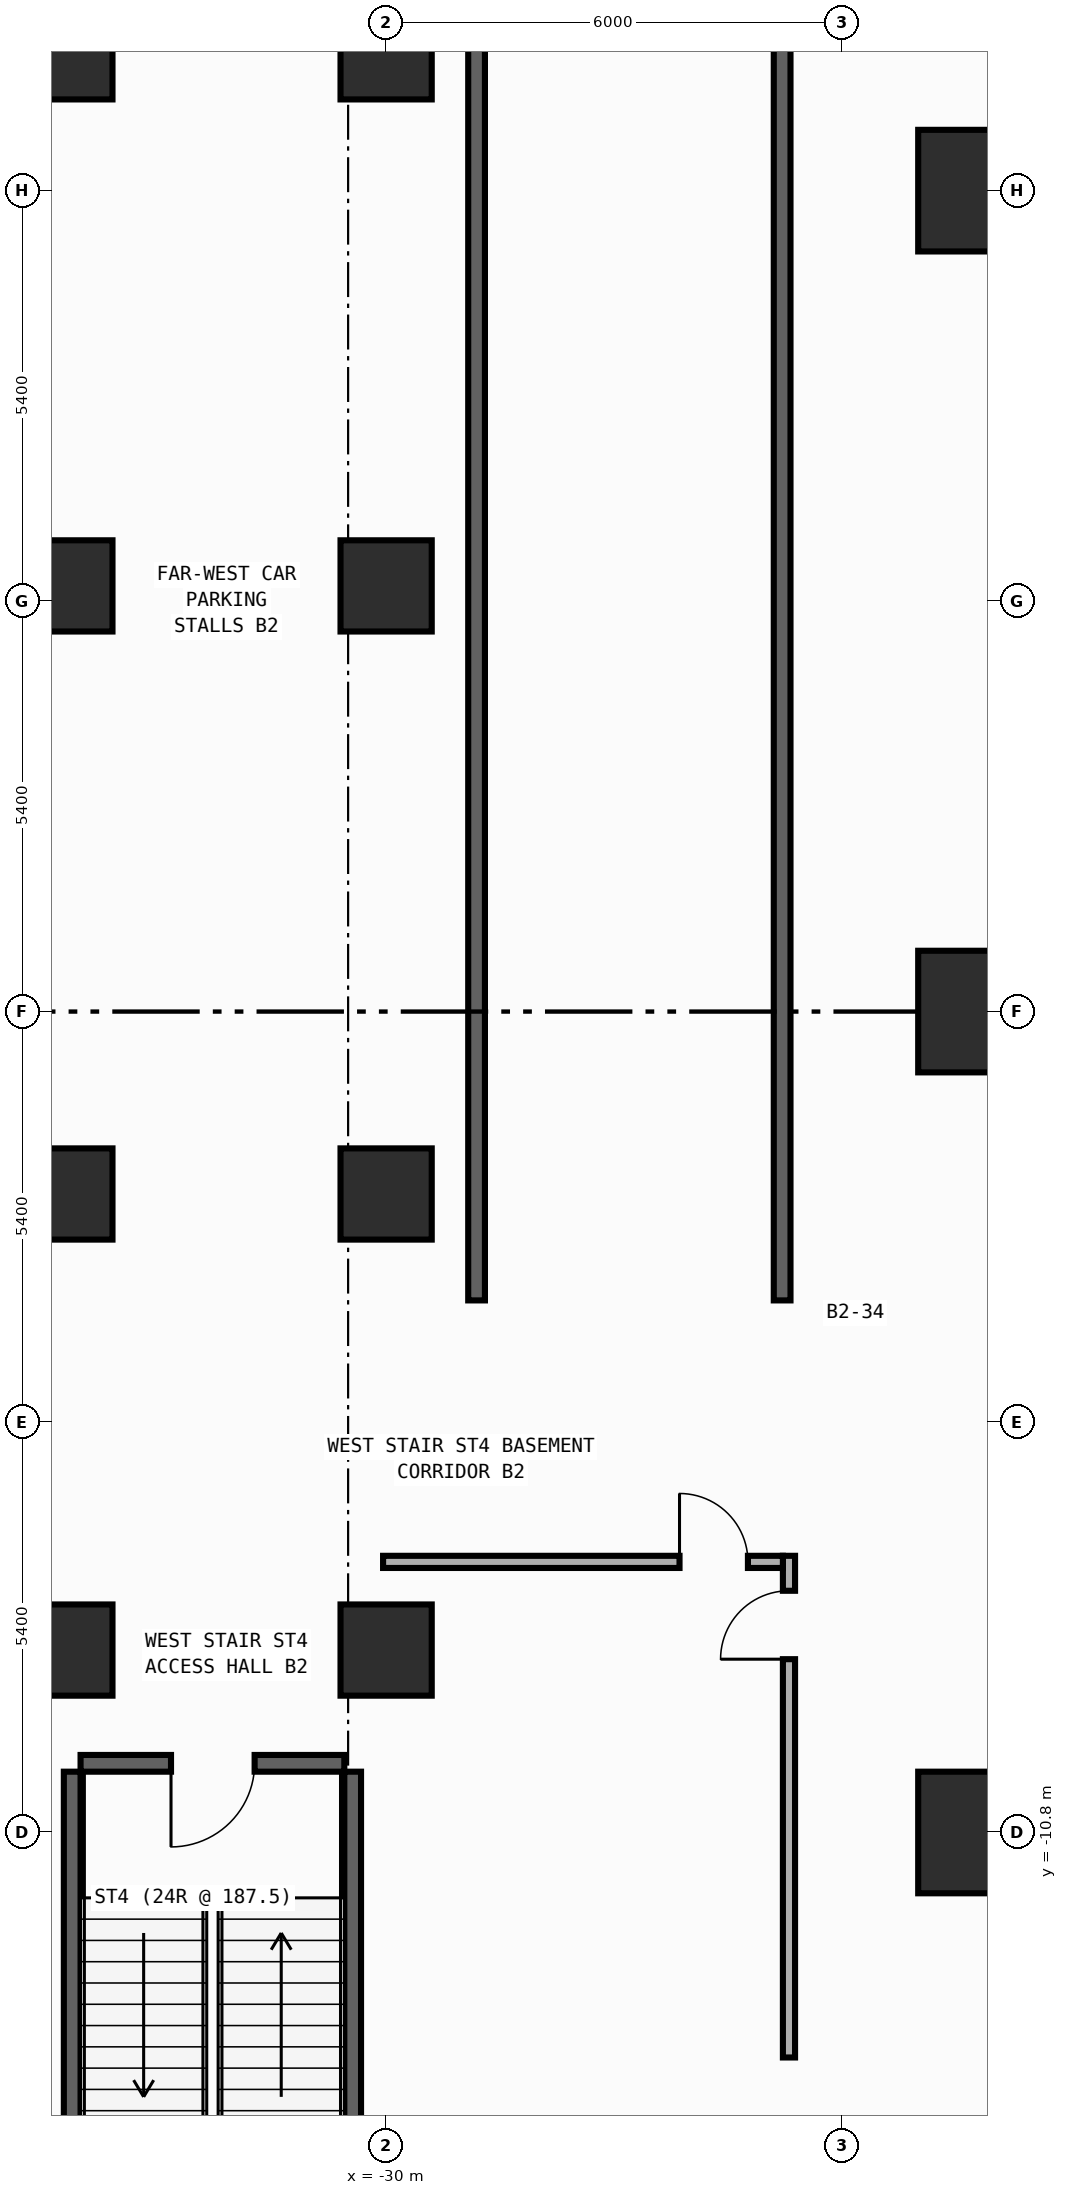
"""IFC4 building model, lengths in metres.
Left out: names, types, materials, properties, quantities, classifications, styles, units other than length and angle.
Written with IfcOpenShell. Run it as: python <this file> out.ifc"""

import sys

from ifc_helpers import new_model, si_unit, direction, frame, frame_2d, origin, origin_2d, place, context, subcontext, project, spatial, rectangle, extrude, element, fill, save


model = new_model("IFC4")
c1 = context("Model", 3, precision=1e-05, world=origin(), true_north=direction((0.0, 1.0)))
c2 = subcontext(c1, "Body", "Model", "MODEL_VIEW")
j1 = project(units=[si_unit("LENGTHUNIT", "METRE"), si_unit("PLANEANGLEUNIT", "RADIAN")], contexts=[c1])
p1 = place(None, origin())
s1 = spatial("IfcSite", under=j1, at=p1, CompositionType="ELEMENT")
p2 = place(p1, origin())
s2 = spatial("IfcBuilding", under=s1, at=p2, CompositionType="ELEMENT")
p3 = place(p2, frame((0.0, 0.0, -9.0)))
s3 = spatial("IfcBuildingStorey", under=s2, at=p3, CompositionType="ELEMENT", Elevation=-9.0)
p4 = place(p3, frame((-30.55, -9.89, 0.0), z_axis=(0.0, 0.0, 1.0), x_axis=(-1.0, 0.0, 0.0)))
e1 = element("IfcWall", 1, at=p4, inside=s3, PredefinedType="SHEAR", context=c2, shape_type="SweptSolid", body=[
    extrude(rectangle(XDim=3.47, YDim=0.22, at=frame_2d((1.735, 0.0))), origin(), (0.0, 0.0, 1.0), 4.2),
])
p5 = place(p4, frame((1.18, 0.0, 0.0)))
e2 = element("IfcOpeningElement", 2, at=p5, cuts=e1, PredefinedType="OPENING", context=c2, shape_type="SweptSolid", body=[
    extrude(rectangle(XDim=1.1, YDim=2.2, at=frame_2d((0.55, 1.1))), frame((0.0, 0.12, 0.0), z_axis=(0.0, -1.0, 0.0), x_axis=(1.0, 0.0, 0.0)), (0.0, 0.0, 1.0), 0.24),
])
for number, where, z_axis, x_axis in (
    (3, (-34.13, -19.8, 0.0), (0.0, 0.0, 1.0), (0.0, 1.0, 0.0)),
    (4, (-30.44, -19.8, 0.0), (0.0, 0.0, 1.0), (0.0, 1.0, 0.0)),
):
    element("IfcWall", number, at=place(p3, frame(where, z_axis=z_axis, x_axis=x_axis)), inside=s3, PredefinedType="SHEAR", context=c2, shape_type="SweptSolid", body=[
        extrude(rectangle(XDim=9.8, YDim=0.22, at=frame_2d((4.9, 0.0))), origin(), (0.0, 0.0, 1.0), 4.2),
    ])
for number, where, z_axis, x_axis in (
    (5, (-34.2, -8.4, 0.0), (0.0, 0.0, 1.0), (1.0, 0.0, 0.0)),
    (6, (-34.2, -2.4, 0.0), (0.0, 0.0, 1.0), (1.0, 0.0, 0.0)),
    (7, (-34.2, 5.6, 0.0), (0.0, 0.0, 1.0), (1.0, 0.0, 0.0)),
    (8, (-34.2, 12.6, 0.0), (0.0, 0.0, 1.0), (1.0, 0.0, 0.0)),
    (9, (-30.0, -8.4, 0.0), (0.0, 0.0, 1.0), (1.0, 0.0, 0.0)),
    (10, (-30.0, -2.4, 0.0), (0.0, 0.0, 1.0), (1.0, 0.0, 0.0)),
    (11, (-30.0, 5.6, 0.0), (0.0, 0.0, 1.0), (1.0, 0.0, 0.0)),
    (12, (-30.0, 12.6, 0.0), (0.0, 0.0, 1.0), (1.0, 0.0, 0.0)),
):
    element("IfcColumn", number, at=place(p3, frame(where, z_axis=z_axis, x_axis=x_axis)), inside=s3, PredefinedType="COLUMN", context=c2, shape_type="SweptSolid", body=[
        extrude(rectangle(XDim=1.2, YDim=1.2, at=origin_2d()), origin(), (0.0, 0.0, 1.0), 4.5),
    ])
for number, where, z_axis, x_axis in (
    (13, (-22.2, -10.8, 0.0), (0.0, 0.0, 1.0), (1.0, 0.0, 0.0)),
    (14, (-22.2, 0.0, 0.0), (0.0, 0.0, 1.0), (1.0, 0.0, 0.0)),
    (15, (-22.2, 10.8, 0.0), (0.0, 0.0, 1.0), (1.0, 0.0, 0.0)),
):
    element("IfcColumn", number, at=place(p3, frame(where, z_axis=z_axis, x_axis=x_axis)), inside=s3, PredefinedType="COLUMN", context=c2, shape_type="SweptSolid", body=[
        extrude(rectangle(XDim=1.6, YDim=1.6, at=origin_2d()), origin(), (0.0, 0.0, 1.0), 4.5),
    ])
for number, where, z_axis, x_axis in (
    (16, (-28.81, -3.8, 0.0), (0.0, 0.0, 1.0), (0.0, 1.0, 0.0)),
    (17, (-24.79, -3.8, 0.0), (0.0, 0.0, 1.0), (0.0, 1.0, 0.0)),
):
    element("IfcWall", number, at=place(p3, frame(where, z_axis=z_axis, x_axis=x_axis)), inside=s3, PredefinedType="SHEAR", context=c2, shape_type="SweptSolid", body=[
        extrude(rectangle(XDim=29.66, YDim=0.22, at=frame_2d((14.83, 0.0))), origin(), (0.0, 0.0, 1.0), 4.2),
    ])
p6 = place(p3, frame((-24.7, -13.76, 0.0), z_axis=(0.0, 0.0, 1.0), x_axis=(0.0, 1.0, 0.0)))
e18 = element("IfcWall", 18, at=p6, inside=s3, PredefinedType="PARTITIONING", context=c2, shape_type="SweptSolid", body=[
    extrude(rectangle(XDim=6.6, YDim=0.16, at=frame_2d((3.3, 0.0))), origin(), (0.0, 0.0, 1.0), 4.2),
])
p7 = place(p6, frame((5.24, 0.0, 0.0)))
e19 = element("IfcOpeningElement", 19, at=p7, cuts=e18, PredefinedType="OPENING", context=c2, shape_type="SweptSolid", body=[
    extrude(rectangle(XDim=0.9, YDim=2.15, at=frame_2d((0.45, 1.075))), frame((0.0, 0.09, 0.0), z_axis=(0.0, -1.0, 0.0), x_axis=(1.0, 0.0, 0.0)), (0.0, 0.0, 1.0), 0.18),
])
p8 = place(p3, frame((-30.04, -7.24, 0.0), z_axis=(0.0, 0.0, 1.0), x_axis=(1.0, 0.0, 0.0)))
e20 = element("IfcWall", 20, at=p8, inside=s3, PredefinedType="PARTITIONING", context=c2, shape_type="SweptSolid", body=[
    extrude(rectangle(XDim=5.26, YDim=0.16, at=frame_2d((2.63, 0.0))), origin(), (0.0, 0.0, 1.0), 4.2),
])
p9 = place(p8, frame((3.9, 0.0, 0.0)))
e21 = element("IfcOpeningElement", 21, at=p9, cuts=e20, PredefinedType="OPENING", context=c2, shape_type="SweptSolid", body=[
    extrude(rectangle(XDim=0.9, YDim=2.15, at=frame_2d((0.45, 1.075))), frame((0.0, 0.09, 0.0), z_axis=(0.0, -1.0, 0.0), x_axis=(1.0, 0.0, 0.0)), (0.0, 0.0, 1.0), 0.18),
])
p10 = place(p5, origin())
e22 = element("IfcDoor", 22, at=p10, inside=s3, OperationType="SINGLE_SWING_RIGHT", PredefinedType="DOOR", context=c2, shape_type="SweptSolid", body=[
    extrude(rectangle(XDim=1.1, YDim=2.2, at=frame_2d((0.55, 1.1))), frame((0.0, 0.025, 0.0), z_axis=(0.0, -1.0, 0.0), x_axis=(1.0, 0.0, 0.0)), (0.0, 0.0, 1.0), 0.05),
])
fill(e2, e22)
p11 = place(p7, origin())
e23 = element("IfcDoor", 23, at=p11, inside=s3, OperationType="SINGLE_SWING_LEFT", PredefinedType="DOOR", context=c2, shape_type="SweptSolid", body=[
    extrude(rectangle(XDim=0.9, YDim=2.15, at=frame_2d((0.45, 1.075))), frame((0.0, 0.025, 0.0), z_axis=(0.0, -1.0, 0.0), x_axis=(1.0, 0.0, 0.0)), (0.0, 0.0, 1.0), 0.05),
])
fill(e19, e23)
p12 = place(p9, origin())
e24 = element("IfcDoor", 24, at=p12, inside=s3, OperationType="SINGLE_SWING_LEFT", PredefinedType="DOOR", context=c2, shape_type="SweptSolid", body=[
    extrude(rectangle(XDim=0.9, YDim=2.15, at=frame_2d((0.45, 1.075))), frame((0.0, 0.025, 0.0), z_axis=(0.0, -1.0, 0.0), x_axis=(1.0, 0.0, 0.0)), (0.0, 0.0, 1.0), 0.05),
])
fill(e21, e24)
save(model, sys.argv[1])
